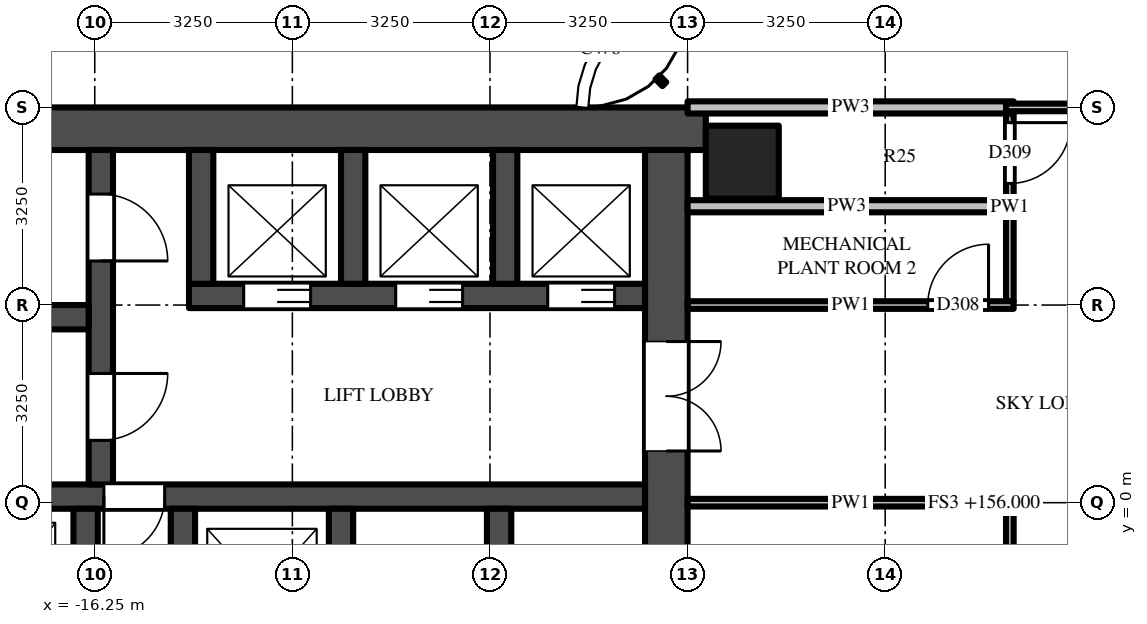
"""IFC4 building model, lengths in metres.
Left out: names, types, materials, properties, quantities, classifications, styles, units other than length and angle.
Written with IfcOpenShell. Run it as: python <this file> out.ifc"""

import sys

from ifc_helpers import new_model, si_unit, direction, frame, frame_2d, origin, origin_2d, place, context, subcontext, project, spatial, rectangle, extrude, source, transform, mapped, element, fill, save


model = new_model("IFC4")
c1 = context("Model", 3, precision=1e-05, world=origin(), true_north=direction((0.0, 1.0)))
c2 = subcontext(c1, "Body", "Model", "MODEL_VIEW")
j1 = project(units=[si_unit("LENGTHUNIT", "METRE"), si_unit("PLANEANGLEUNIT", "RADIAN")], contexts=[c1])
p1 = place(None, origin())
s1 = spatial("IfcSite", under=j1, at=p1, CompositionType="ELEMENT")
p2 = place(p1, origin())
s2 = spatial("IfcBuilding", under=s1, at=p2, CompositionType="ELEMENT")
p3 = place(p2, frame((0.0, 0.0, 156.0)))
s3 = spatial("IfcBuildingStorey", under=s2, at=p3, CompositionType="ELEMENT", Elevation=156.0)
m1 = source(origin(), c2, "Body", "SweptSolid", [
    extrude(rectangle(XDim=1.2, YDim=1.2, at=origin_2d()), origin(), (0.0, 0.0, 1.0), 6.0),
])
p4 = place(p3, frame((-5.6, 5.6, 0.0), z_axis=(0.0, 0.0, 1.0), x_axis=(1.0, 0.0, 0.0)))
e1 = element("IfcColumn", 1, at=p4, inside=s3, PredefinedType="COLUMN", context=c2, shape_type="MappedRepresentation", body=[
    mapped(m1, transform((0.0, 0.0, 0.0))),
])
m2 = source(origin(), c2, "Body", "SweptSolid", [
    extrude(rectangle(XDim=16.55, YDim=0.7, at=frame_2d((8.275, 0.0))), origin(), (0.0, 0.0, 1.0), 5.8),
])
p5 = place(p3, frame((-6.2, 6.15, 0.0), z_axis=(0.0, 0.0, 1.0), x_axis=(-1.0, 0.0, 0.0)))
e2 = element("IfcWall", 2, at=p5, inside=s3, PredefinedType="SHEAR", context=c2, shape_type="MappedRepresentation", body=[
    mapped(m2, transform((0.0, 0.0, 0.0))),
])
m3 = source(origin(), c2, "Body", "SweptSolid", [
    extrude(rectangle(XDim=9.05, YDim=0.7, at=frame_2d((4.525, 0.0))), origin(), (0.0, 0.0, 1.0), 5.8),
])
p6 = place(p3, frame((-6.85, 5.8, 0.0), z_axis=(0.0, 0.0, 1.0), x_axis=(0.0, -1.0, 0.0)))
e3 = element("IfcWall", 3, at=p6, inside=s3, PredefinedType="SHEAR", context=c2, shape_type="MappedRepresentation", body=[
    mapped(m3, transform((0.0, 0.0, 0.0))),
])
m4 = source(origin(), c2, "Body", "SweptSolid", [
    extrude(rectangle(XDim=1.8, YDim=2.1, at=frame_2d((0.9, 1.05))), frame((0.0, 0.36, 0.0), z_axis=(0.0, -1.0, 0.0), x_axis=(1.0, 0.0, 0.0)), (0.0, 0.0, 1.0), 0.72),
])
p7 = place(p6, frame((3.15, 0.0, 0.0)))
e4 = element("IfcOpeningElement", 4, at=p7, cuts=e3, PredefinedType="OPENING", context=c2, shape_type="MappedRepresentation", body=[
    mapped(m4, transform((0.0, 0.0, 0.0))),
])
m5 = source(origin(), c2, "Body", "SweptSolid", [
    extrude(rectangle(XDim=7.5, YDim=0.4, at=frame_2d((3.75, 0.0))), origin(), (0.0, 0.0, 1.0), 5.8),
])
p8 = place(p3, frame((-7.2, 3.4, 0.0), z_axis=(0.0, 0.0, 1.0), x_axis=(-1.0, 0.0, 0.0)))
e5 = element("IfcWall", 5, at=p8, inside=s3, PredefinedType="SHEAR", context=c2, shape_type="MappedRepresentation", body=[
    mapped(m5, transform((0.0, 0.0, 0.0))),
])
m6 = source(origin(), c2, "Body", "SweptSolid", [
    extrude(rectangle(XDim=1.1, YDim=2.1, at=frame_2d((0.55, 1.05))), frame((0.0, 0.21, 0.0), z_axis=(0.0, -1.0, 0.0), x_axis=(1.0, 0.0, 0.0)), (0.0, 0.0, 1.0), 0.42),
])
p9 = place(p8, frame((0.5, 0.0, 0.0)))
e6 = element("IfcOpeningElement", 6, at=p9, cuts=e5, PredefinedType="OPENING", context=c2, shape_type="MappedRepresentation", body=[
    mapped(m6, transform((0.0, 0.0, 0.0))),
])
p10 = place(p8, frame((3.0, 0.0, 0.0)))
e7 = element("IfcOpeningElement", 7, at=p10, cuts=e5, PredefinedType="OPENING", context=c2, shape_type="MappedRepresentation", body=[
    mapped(m6, transform((0.0, 0.0, 0.0))),
])
p11 = place(p8, frame((5.5, 0.0, 0.0)))
e8 = element("IfcOpeningElement", 8, at=p11, cuts=e5, PredefinedType="OPENING", context=c2, shape_type="MappedRepresentation", body=[
    mapped(m6, transform((0.0, 0.0, 0.0))),
])
m7 = source(origin(), c2, "Body", "SweptSolid", [
    extrude(rectangle(XDim=14.85, YDim=0.4, at=frame_2d((7.425, 0.0))), origin(), (0.0, 0.0, 1.0), 5.8),
])
p12 = place(p3, frame((-7.2, 0.1, 0.0), z_axis=(0.0, 0.0, 1.0), x_axis=(-1.0, 0.0, 0.0)))
e9 = element("IfcWall", 9, at=p12, inside=s3, PredefinedType="SHEAR", context=c2, shape_type="MappedRepresentation", body=[
    mapped(m7, transform((0.0, 0.0, 0.0))),
])
m8 = source(origin(), c2, "Body", "SweptSolid", [
    extrude(rectangle(XDim=1.0, YDim=2.1, at=frame_2d((0.5, 1.05))), frame((0.0, 0.21, 0.0), z_axis=(0.0, -1.0, 0.0), x_axis=(1.0, 0.0, 0.0)), (0.0, 0.0, 1.0), 0.42),
])
p13 = place(p12, frame((7.9, 0.0, 0.0)))
e10 = element("IfcOpeningElement", 10, at=p13, cuts=e9, PredefinedType="OPENING", context=c2, shape_type="MappedRepresentation", body=[
    mapped(m8, transform((0.0, 0.0, 0.0))),
])
m9 = source(origin(), c2, "Body", "SweptSolid", [
    extrude(rectangle(XDim=5.5, YDim=0.4, at=frame_2d((2.75, 0.0))), origin(), (0.0, 0.0, 1.0), 5.8),
])
p14 = place(p3, frame((-16.15, 5.8, 0.0), z_axis=(0.0, 0.0, 1.0), x_axis=(0.0, -1.0, 0.0)))
e11 = element("IfcWall", 11, at=p14, inside=s3, PredefinedType="SHEAR", context=c2, shape_type="MappedRepresentation", body=[
    mapped(m9, transform((0.0, 0.0, 0.0))),
])
p15 = place(p14, frame((0.725, 0.0, 0.0)))
e12 = element("IfcOpeningElement", 12, at=p15, cuts=e11, PredefinedType="OPENING", context=c2, shape_type="MappedRepresentation", body=[
    mapped(m6, transform((0.0, 0.0, 0.0))),
])
p16 = place(p14, frame((3.675, 0.0, 0.0)))
e13 = element("IfcOpeningElement", 13, at=p16, cuts=e11, PredefinedType="OPENING", context=c2, shape_type="MappedRepresentation", body=[
    mapped(m6, transform((0.0, 0.0, 0.0))),
])
m10 = source(origin(), c2, "Body", "SweptSolid", [
    extrude(rectangle(XDim=5.7, YDim=0.4, at=frame_2d((2.85, 0.0))), origin(), (0.0, 0.0, 1.0), 5.8),
])
p17 = place(p3, frame((-16.35, 3.05, 0.0), z_axis=(0.0, 0.0, 1.0), x_axis=(-1.0, 0.0, 0.0)))
e14 = element("IfcWall", 14, at=p17, inside=s3, PredefinedType="SHEAR", context=c2, shape_type="MappedRepresentation", body=[
    mapped(m10, transform((0.0, 0.0, 0.0))),
])
m11 = source(origin(), c2, "Body", "SweptSolid", [
    extrude(rectangle(XDim=2.2, YDim=0.4, at=frame_2d((1.1, 0.0))), origin(), (0.0, 0.0, 1.0), 5.8),
])
for number, where, z_axis, x_axis in (
    (15, (-9.5, 5.8, 0.0), (0.0, 0.0, 1.0), (0.0, -1.0, 0.0)),
    (16, (-12.0, 5.8, 0.0), (0.0, 0.0, 1.0), (0.0, -1.0, 0.0)),
    (17, (-14.5, 5.8, 0.0), (0.0, 0.0, 1.0), (0.0, -1.0, 0.0)),
):
    element("IfcWall", number, at=place(p3, frame(where, z_axis=z_axis, x_axis=x_axis)), inside=s3, PredefinedType="SHEAR", context=c2, shape_type="MappedRepresentation", body=[
        mapped(m11, transform((0.0, 0.0, 0.0))),
    ])
m12 = source(origin(), c2, "Body", "SweptSolid", [
    extrude(rectangle(XDim=2.45, YDim=0.4, at=frame_2d((1.225, 0.0))), origin(), (0.0, 0.0, 1.0), 5.8),
])
for number, where, z_axis, x_axis in (
    (18, (-9.6, -0.1, 0.0), (0.0, 0.0, 1.0), (0.0, -1.0, 0.0)),
    (19, (-12.2, -0.1, 0.0), (0.0, 0.0, 1.0), (0.0, -1.0, 0.0)),
    (20, (-14.8, -0.1, 0.0), (0.0, 0.0, 1.0), (0.0, -1.0, 0.0)),
    (21, (-16.4, -0.1, 0.0), (0.0, 0.0, 1.0), (0.0, -1.0, 0.0)),
):
    element("IfcWall", number, at=place(p3, frame(where, z_axis=z_axis, x_axis=x_axis)), inside=s3, PredefinedType="SHEAR", context=c2, shape_type="MappedRepresentation", body=[
        mapped(m12, transform((0.0, 0.0, 0.0))),
    ])
m13 = source(origin(), c2, "Body", "SweptSolid", [
    extrude(rectangle(XDim=3.125, YDim=0.125, at=frame_2d((1.562, 0.0))), origin(), (0.0, 0.0, 1.0), 5.168),
])
p18 = place(p3, frame((-1.2, -0.062, 0.0), z_axis=(0.0, 0.0, 1.0), x_axis=(0.0, -1.0, 0.0)))
e22 = element("IfcWall", 22, at=p18, inside=s3, PredefinedType="PARTITIONING", context=c2, shape_type="MappedRepresentation", body=[
    mapped(m13, transform((0.0, 0.0, 0.0))),
])
p19 = place(p3, frame((-1.2, 6.4, 0.0), z_axis=(0.0, 0.0, 1.0), x_axis=(0.0, -1.0, 0.0)))
e23 = element("IfcWall", 23, at=p19, inside=s3, PredefinedType="PARTITIONING", context=c2, shape_type="SweptSolid", body=[
    extrude(rectangle(XDim=3.087, YDim=0.125, at=frame_2d((1.544, 0.0))), origin(), (0.0, 0.0, 1.0), 5.097),
])
m14 = source(origin(), c2, "Body", "SweptSolid", [
    extrude(rectangle(XDim=1.0, YDim=2.1, at=frame_2d((0.5, 1.05))), frame((0.0, 0.073, 0.0), z_axis=(0.0, -1.0, 0.0), x_axis=(1.0, 0.0, 0.0)), (0.0, 0.0, 1.0), 0.145),
])
p20 = place(p19, frame((0.15, 0.0, 0.0)))
e24 = element("IfcOpeningElement", 24, at=p20, cuts=e23, PredefinedType="OPENING", context=c2, shape_type="MappedRepresentation", body=[
    mapped(m14, transform((0.0, 0.0, 0.0))),
])
m15 = source(origin(), c2, "Body", "SweptSolid", [
    extrude(rectangle(XDim=5.363, YDim=0.125, at=frame_2d((2.681, 0.0))), origin(), (0.0, 0.0, 1.0), 5.097),
])
p21 = place(p3, frame((-1.137, 0.0, 0.0), z_axis=(0.0, 0.0, 1.0), x_axis=(-1.0, 0.0, 0.0)))
e25 = element("IfcWall", 25, at=p21, inside=s3, PredefinedType="PARTITIONING", context=c2, shape_type="MappedRepresentation", body=[
    mapped(m15, transform((0.0, 0.0, 0.0))),
])
p22 = place(p3, frame((-6.5, 3.25, 0.0), z_axis=(0.0, 0.0, 1.0), x_axis=(1.0, 0.0, 0.0)))
e26 = element("IfcWall", 26, at=p22, inside=s3, PredefinedType="PARTITIONING", context=c2, shape_type="MappedRepresentation", body=[
    mapped(m15, transform((0.0, 0.0, 0.0))),
])
p23 = place(p22, frame((3.95, 0.0, 0.0)))
e27 = element("IfcOpeningElement", 27, at=p23, cuts=e26, PredefinedType="OPENING", context=c2, shape_type="MappedRepresentation", body=[
    mapped(m14, transform((0.0, 0.0, 0.0))),
])
p24 = place(p3, frame((-6.5, 4.875, 0.0), z_axis=(0.0, 0.0, 1.0), x_axis=(1.0, 0.0, 0.0)))
e28 = element("IfcWall", 28, at=p24, inside=s3, PredefinedType="PARTITIONING", context=c2, shape_type="SweptSolid", body=[
    extrude(rectangle(XDim=5.238, YDim=0.2, at=frame_2d((2.619, 0.0))), origin(), (0.0, 0.0, 1.0), 5.097),
])
p25 = place(p3, frame((-6.5, 6.5, 0.0), z_axis=(0.0, 0.0, 1.0), x_axis=(1.0, 0.0, 0.0)))
e29 = element("IfcWall", 29, at=p25, inside=s3, PredefinedType="PARTITIONING", context=c2, shape_type="SweptSolid", body=[
    extrude(rectangle(XDim=5.363, YDim=0.2, at=frame_2d((2.681, 0.0))), origin(), (0.0, 0.0, 1.0), 4.88),
])
p26 = place(p3, frame((-1.262, 6.5, 0.0), z_axis=(0.0, 0.0, 1.0), x_axis=(1.0, 0.0, 0.0)))
e30 = element("IfcWall", 30, at=p26, inside=s3, PredefinedType="PARTITIONING", context=c2, shape_type="SweptSolid", body=[
    extrude(rectangle(XDim=7.825, YDim=0.125, at=frame_2d((3.913, 0.0))), origin(), (0.0, 0.0, 1.0), 4.88),
])
m16 = source(origin(), c2, "Body", "SweptSolid", [
    extrude(rectangle(XDim=1.8, YDim=2.1, at=frame_2d((0.9, 1.05))), frame((0.0, 0.073, 0.0), z_axis=(0.0, -1.0, 0.0), x_axis=(1.0, 0.0, 0.0)), (0.0, 0.0, 1.0), 0.145),
])
p27 = place(p26, frame((4.413, 0.0, 0.0)))
e31 = element("IfcOpeningElement", 31, at=p27, cuts=e30, PredefinedType="OPENING", context=c2, shape_type="MappedRepresentation", body=[
    mapped(m16, transform((0.0, 0.0, 0.0))),
])
m17 = source(origin(), c2, "Body", "SweptSolid", [
    extrude(rectangle(XDim=1.1, YDim=2.1, at=frame_2d((0.55, 1.05))), frame((0.0, 0.025, 0.0), z_axis=(0.0, -1.0, 0.0), x_axis=(1.0, 0.0, 0.0)), (0.0, 0.0, 1.0), 0.05),
])
p28 = place(p9, origin())
e32 = element("IfcDoor", 32, at=p28, inside=s3, OperationType="DOUBLE_DOOR_SLIDING", PredefinedType="DOOR", context=c2, shape_type="MappedRepresentation", body=[
    mapped(m17, transform((0.0, 0.0, 0.0))),
])
fill(e6, e32)
p29 = place(p10, origin())
e33 = element("IfcDoor", 33, at=p29, inside=s3, OperationType="DOUBLE_DOOR_SLIDING", PredefinedType="DOOR", context=c2, shape_type="MappedRepresentation", body=[
    mapped(m17, transform((0.0, 0.0, 0.0))),
])
fill(e7, e33)
p30 = place(p11, origin())
e34 = element("IfcDoor", 34, at=p30, inside=s3, OperationType="DOUBLE_DOOR_SLIDING", PredefinedType="DOOR", context=c2, shape_type="MappedRepresentation", body=[
    mapped(m17, transform((0.0, 0.0, 0.0))),
])
fill(e8, e34)
m18 = source(origin(), c2, "Body", "SweptSolid", [
    extrude(rectangle(XDim=1.8, YDim=2.1, at=frame_2d((0.9, 1.05))), frame((0.0, -0.275, 0.0), z_axis=(0.0, -1.0, 0.0), x_axis=(1.0, 0.0, 0.0)), (0.0, 0.0, 1.0), 0.05),
])
p31 = place(p7, origin())
e35 = element("IfcDoor", 35, at=p31, inside=s3, OperationType="DOUBLE_DOOR_SINGLE_SWING", PredefinedType="DOOR", context=c2, shape_type="MappedRepresentation", body=[
    mapped(m18, transform((0.0, 0.0, 0.0))),
])
fill(e4, e35)
p32 = place(p15, origin())
e36 = element("IfcDoor", 36, at=p32, inside=s3, OperationType="SINGLE_SWING_RIGHT", PredefinedType="DOOR", context=c2, shape_type="MappedRepresentation", body=[
    mapped(m17, transform((0.0, 0.0, 0.0))),
])
fill(e12, e36)
p33 = place(p16, origin())
e37 = element("IfcDoor", 37, at=p33, inside=s3, OperationType="SINGLE_SWING_LEFT", PredefinedType="DOOR", context=c2, shape_type="MappedRepresentation", body=[
    mapped(m17, transform((0.0, 0.0, 0.0))),
])
fill(e13, e37)
m19 = source(origin(), c2, "Body", "SweptSolid", [
    extrude(rectangle(XDim=1.0, YDim=2.1, at=frame_2d((0.5, 1.05))), frame((0.0, 0.025, 0.0), z_axis=(0.0, -1.0, 0.0), x_axis=(1.0, 0.0, 0.0)), (0.0, 0.0, 1.0), 0.05),
])
p34 = place(p13, origin())
e38 = element("IfcDoor", 38, at=p34, inside=s3, OperationType="SINGLE_SWING_RIGHT", PredefinedType="DOOR", context=c2, shape_type="MappedRepresentation", body=[
    mapped(m19, transform((0.0, 0.0, 0.0))),
])
fill(e10, e38)
p35 = place(p23, origin())
e39 = element("IfcDoor", 39, at=p35, inside=s3, OperationType="SINGLE_SWING_RIGHT", PredefinedType="DOOR", context=c2, shape_type="MappedRepresentation", body=[
    mapped(m19, transform((0.0, 0.0, 0.0))),
])
fill(e27, e39)
p36 = place(p20, origin())
e40 = element("IfcDoor", 40, at=p36, inside=s3, OperationType="SINGLE_SWING_LEFT", PredefinedType="DOOR", context=c2, shape_type="MappedRepresentation", body=[
    mapped(m19, transform((0.0, 0.0, 0.0))),
])
fill(e24, e40)
save(model, sys.argv[1])
